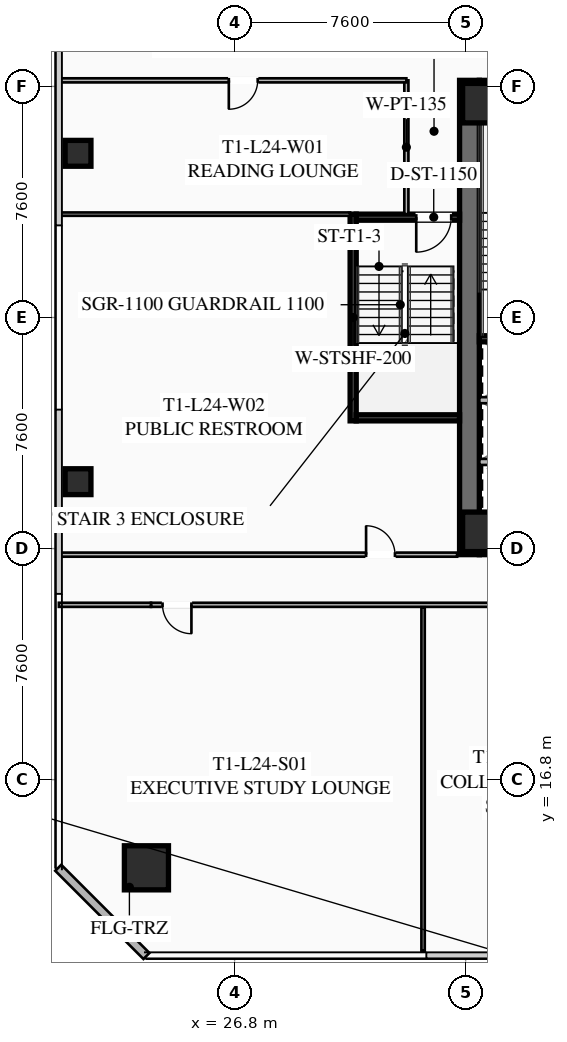
"""IFC4 building model, lengths in metres.
Left out: names, types, materials, properties, quantities, classifications, styles, units other than length and angle.
Written with IfcOpenShell. Run it as: python <this file> out.ifc"""

import sys

from ifc_helpers import new_model, si_unit, direction, frame, frame_2d, origin, origin_2d, place, context, subcontext, project, spatial, rectangle, hollow_rectangle, extrude, element, fill, save


model = new_model("IFC4")
c1 = context("Model", 3, precision=1e-05, world=origin(), true_north=direction((0.0, 1.0)))
c2 = subcontext(c1, "Body", "Model", "MODEL_VIEW")
j1 = project(units=[si_unit("LENGTHUNIT", "METRE"), si_unit("PLANEANGLEUNIT", "RADIAN")], contexts=[c1])
p1 = place(None, origin())
s1 = spatial("IfcSite", under=j1, at=p1, CompositionType="ELEMENT")
p2 = place(p1, origin())
s2 = spatial("IfcBuilding", under=s1, at=p2, CompositionType="ELEMENT")
p3 = place(p2, frame((0.0, 0.0, 92.05)))
s3 = spatial("IfcBuildingStorey", under=s2, at=p3, CompositionType="ELEMENT", Elevation=92.05)
p4 = place(p3, frame((34.525, 24.2, 0.0), z_axis=(0.0, 0.0, 1.0), x_axis=(0.0, 1.0, 0.0)))
e1 = element("IfcWall", 1, at=p4, inside=s3, PredefinedType="SHEAR", context=c2, shape_type="SweptSolid", body=[
    extrude(rectangle(XDim=15.6, YDim=0.65, at=frame_2d((7.8, 0.0))), origin(), (0.0, 0.0, 1.0), 3.55),
])
p5 = place(p3, frame((49.15, 24.525, 0.0), z_axis=(0.0, 0.0, 1.0), x_axis=(-1.0, 0.0, 0.0)))
e2 = element("IfcWall", 2, at=p5, inside=s3, PredefinedType="SHEAR", context=c2, shape_type="SweptSolid", body=[
    extrude(rectangle(XDim=14.3, YDim=0.65, at=frame_2d((7.15, 0.0))), origin(), (0.0, 0.0, 1.0), 3.55),
])
p6 = place(p5, frame((8.85, 0.0, 0.0)))
e3 = element("IfcOpeningElement", 3, at=p6, cuts=e2, PredefinedType="OPENING", context=c2, shape_type="SweptSolid", body=[
    extrude(rectangle(XDim=1.25, YDim=2.25, at=frame_2d((0.625, 1.125))), frame((0.0, 0.335, 0.0), z_axis=(0.0, -1.0, 0.0), x_axis=(1.0, 0.0, 0.0)), (0.0, 0.0, 1.0), 0.67),
])
p7 = place(p5, frame((3.8, 0.0, 0.0)))
e4 = element("IfcOpeningElement", 4, at=p7, cuts=e2, PredefinedType="OPENING", context=c2, shape_type="SweptSolid", body=[
    extrude(rectangle(XDim=1.25, YDim=2.25, at=frame_2d((0.625, 1.125))), frame((0.0, 0.335, 0.0), z_axis=(0.0, -1.0, 0.0), x_axis=(1.0, 0.0, 0.0)), (0.0, 0.0, 1.0), 0.67),
])
p8 = place(p3, frame((34.85, 39.475, 0.0), z_axis=(0.0, 0.0, 1.0), x_axis=(1.0, 0.0, 0.0)))
e5 = element("IfcWall", 5, at=p8, inside=s3, PredefinedType="SHEAR", context=c2, shape_type="SweptSolid", body=[
    extrude(rectangle(XDim=14.3, YDim=0.65, at=frame_2d((7.15, 0.0))), origin(), (0.0, 0.0, 1.0), 3.55),
])
p9 = place(p8, frame((4.2, 0.0, 0.0)))
e6 = element("IfcOpeningElement", 6, at=p9, cuts=e5, PredefinedType="OPENING", context=c2, shape_type="SweptSolid", body=[
    extrude(rectangle(XDim=1.25, YDim=2.25, at=frame_2d((0.625, 1.125))), frame((0.0, 0.335, 0.0), z_axis=(0.0, -1.0, 0.0), x_axis=(1.0, 0.0, 0.0)), (0.0, 0.0, 1.0), 0.67),
])
p10 = place(p8, frame((9.25, 0.0, 0.0)))
e7 = element("IfcOpeningElement", 7, at=p10, cuts=e5, PredefinedType="OPENING", context=c2, shape_type="SweptSolid", body=[
    extrude(rectangle(XDim=1.25, YDim=2.25, at=frame_2d((0.625, 1.125))), frame((0.0, 0.335, 0.0), z_axis=(0.0, -1.0, 0.0), x_axis=(1.0, 0.0, 0.0)), (0.0, 0.0, 1.0), 0.67),
])
for number, where, z_axis, x_axis in (
    (8, (34.95, 24.95, 0.0), (0.0, 0.0, 1.0), (1.0, 0.0, 0.0)),
    (9, (34.95, 39.05, 0.0), (0.0, 0.0, 1.0), (1.0, 0.0, 0.0)),
):
    element("IfcColumn", number, at=place(p3, frame(where, z_axis=z_axis, x_axis=x_axis)), inside=s3, PredefinedType="COLUMN", context=c2, shape_type="SweptSolid", body=[
        extrude(hollow_rectangle(XDim=1.3, YDim=1.3, WallThickness=0.05, at=origin_2d()), origin(), (0.0, 0.0, 1.0), 3.35),
    ])
p11 = place(p3, frame((23.9, 13.9, 0.0), z_axis=(0.0, 0.0, 1.0), x_axis=(1.0, 0.0, 0.0)))
e10 = element("IfcColumn", 10, at=p11, inside=s3, PredefinedType="COLUMN", context=c2, shape_type="SweptSolid", body=[
    extrude(hollow_rectangle(XDim=1.45, YDim=1.45, WallThickness=0.055, at=origin_2d()), origin(), (0.0, 0.0, 1.0), 3.35),
])
for number, where, z_axis, x_axis in (
    (11, (21.65, 37.4, 0.0), (0.0, 0.0, 1.0), (1.0, 0.0, 0.0)),
    (12, (21.65, 26.6, 0.0), (0.0, 0.0, 1.0), (1.0, 0.0, 0.0)),
):
    element("IfcColumn", number, at=place(p3, frame(where, z_axis=z_axis, x_axis=x_axis)), inside=s3, PredefinedType="COLUMN", context=c2, shape_type="SweptSolid", body=[
        extrude(hollow_rectangle(XDim=0.85, YDim=0.85, WallThickness=0.035, at=origin_2d()), origin(), (0.0, 0.0, 1.0), 3.35),
    ])
p12 = place(p3, frame((23.9, 11.0, 0.0), z_axis=(0.0, 0.0, 1.0), x_axis=(-0.707106781187, 0.707106781187, 0.0)))
e13 = element("IfcWall", 13, at=p12, inside=s3, PredefinedType="SOLIDWALL", context=c2, shape_type="SweptSolid", body=[
    extrude(rectangle(XDim=4.101, YDim=0.28, at=frame_2d((2.051, 0.0))), origin(), (0.0, 0.0, 1.0), 3.35),
])
for number, where, z_axis, x_axis in (
    (14, (34.85, 31.3, 0.0), (0.0, 0.0, 1.0), (1.0, 0.0, 0.0)),
    (15, (34.85, 38.7, 0.0), (0.0, 0.0, 1.0), (1.0, 0.0, 0.0)),
):
    element("IfcWall", number, at=place(p3, frame(where, z_axis=z_axis, x_axis=x_axis)), inside=s3, PredefinedType="SHEAR", context=c2, shape_type="SweptSolid", body=[
        extrude(rectangle(XDim=3.45, YDim=0.2, at=frame_2d((1.725, 0.0))), origin(), (0.0, 0.0, 1.0), 3.35),
    ])
for number, where, z_axis, x_axis in (
    (16, (34.85, 27.25, 0.0), (0.0, 0.0, 1.0), (1.0, 0.0, 0.0)),
    (17, (34.85, 29.28, 0.0), (0.0, 0.0, 1.0), (1.0, 0.0, 0.0)),
):
    element("IfcWall", number, at=place(p3, frame(where, z_axis=z_axis, x_axis=x_axis)), inside=s3, PredefinedType="SOLIDWALL", context=c2, shape_type="SweptSolid", body=[
        extrude(rectangle(XDim=3.1, YDim=0.2, at=frame_2d((1.55, 0.0))), origin(), (0.0, 0.0, 1.0), 3.35),
    ])
p13 = place(p3, frame((30.7, 28.6, 0.0), z_axis=(0.0, 0.0, 1.0), x_axis=(0.0, 1.0, 0.0)))
e18 = element("IfcWall", 18, at=p13, inside=s3, PredefinedType="SHEAR", context=c2, shape_type="SweptSolid", body=[
    extrude(rectangle(XDim=6.8, YDim=0.2, at=frame_2d((3.4, 0.0))), origin(), (0.0, 0.0, 1.0), 3.35),
])
p14 = place(p3, frame((34.2, 35.3, 0.0), z_axis=(0.0, 0.0, 1.0), x_axis=(-1.0, 0.0, 0.0)))
e19 = element("IfcWall", 19, at=p14, inside=s3, PredefinedType="SHEAR", context=c2, shape_type="SweptSolid", body=[
    extrude(rectangle(XDim=3.4, YDim=0.2, at=frame_2d((1.7, 0.0))), origin(), (0.0, 0.0, 1.0), 3.35),
])
p15 = place(p14, frame((0.275, 0.0, 0.0)))
e20 = element("IfcOpeningElement", 20, at=p15, cuts=e19, PredefinedType="OPENING", context=c2, shape_type="SweptSolid", body=[
    extrude(rectangle(XDim=1.15, YDim=2.2, at=frame_2d((0.575, 1.1))), frame((0.0, 0.11, 0.0), z_axis=(0.0, -1.0, 0.0), x_axis=(1.0, 0.0, 0.0)), (0.0, 0.0, 1.0), 0.22),
])
p16 = place(p3, frame((30.8, 28.7, 0.0), z_axis=(0.0, 0.0, 1.0), x_axis=(1.0, 0.0, 0.0)))
e21 = element("IfcWall", 21, at=p16, inside=s3, PredefinedType="SHEAR", context=c2, shape_type="SweptSolid", body=[
    extrude(rectangle(XDim=3.4, YDim=0.2, at=frame_2d((1.7, 0.0))), origin(), (0.0, 0.0, 1.0), 3.35),
])
p17 = place(p3, frame((32.45, 35.4, 0.0), z_axis=(0.0, 0.0, 1.0), x_axis=(0.0, 1.0, 0.0)))
e22 = element("IfcWall", 22, at=p17, inside=s3, PredefinedType="PARTITIONING", context=c2, shape_type="SweptSolid", body=[
    extrude(rectangle(XDim=4.4, YDim=0.135, at=frame_2d((2.2, 0.0))), origin(), (0.0, 0.0, 1.0), 2.703),
])
p18 = place(p3, frame((53.1, 22.55, 0.0), z_axis=(0.0, 0.0, 1.0), x_axis=(-1.0, 0.0, 0.0)))
e23 = element("IfcWall", 23, at=p18, inside=s3, PredefinedType="PARTITIONING", context=c2, shape_type="SweptSolid", body=[
    extrude(rectangle(XDim=29.05, YDim=0.135, at=frame_2d((14.525, 0.0))), origin(), (0.0, 0.0, 1.0), 2.703),
])
p19 = place(p18, frame((27.72, 0.0, 0.0)))
e24 = element("IfcOpeningElement", 24, at=p19, cuts=e23, PredefinedType="OPENING", context=c2, shape_type="SweptSolid", body=[
    extrude(rectangle(XDim=0.95, YDim=2.05, at=frame_2d((0.475, 1.025))), frame((0.0, 0.077, 0.0), z_axis=(0.0, -1.0, 0.0), x_axis=(1.0, 0.0, 0.0)), (0.0, 0.0, 1.0), 0.155),
])
p20 = place(p18, frame((14.601, 0.0, 0.0)))
e25 = element("IfcOpeningElement", 25, at=p20, cuts=e23, PredefinedType="OPENING", context=c2, shape_type="SweptSolid", body=[
    extrude(rectangle(XDim=0.95, YDim=2.05, at=frame_2d((0.475, 1.025))), frame((0.0, 0.077, 0.0), z_axis=(0.0, -1.0, 0.0), x_axis=(1.0, 0.0, 0.0)), (0.0, 0.0, 1.0), 0.155),
])
p21 = place(p18, frame((10.351, 0.0, 0.0)))
e26 = element("IfcOpeningElement", 26, at=p21, cuts=e23, PredefinedType="OPENING", context=c2, shape_type="SweptSolid", body=[
    extrude(rectangle(XDim=0.95, YDim=2.05, at=frame_2d((0.475, 1.025))), frame((0.0, 0.077, 0.0), z_axis=(0.0, -1.0, 0.0), x_axis=(1.0, 0.0, 0.0)), (0.0, 0.0, 1.0), 0.155),
])
p22 = place(p18, frame((6.37, 0.0, 0.0)))
e27 = element("IfcOpeningElement", 27, at=p22, cuts=e23, PredefinedType="OPENING", context=c2, shape_type="SweptSolid", body=[
    extrude(rectangle(XDim=0.95, YDim=2.05, at=frame_2d((0.475, 1.025))), frame((0.0, 0.077, 0.0), z_axis=(0.0, -1.0, 0.0), x_axis=(1.0, 0.0, 0.0)), (0.0, 0.0, 1.0), 0.155),
])
p23 = place(p18, frame((0.38, 0.0, 0.0)))
e28 = element("IfcOpeningElement", 28, at=p23, cuts=e23, PredefinedType="OPENING", context=c2, shape_type="SweptSolid", body=[
    extrude(rectangle(XDim=0.95, YDim=2.05, at=frame_2d((0.475, 1.025))), frame((0.0, 0.077, 0.0), z_axis=(0.0, -1.0, 0.0), x_axis=(1.0, 0.0, 0.0)), (0.0, 0.0, 1.0), 0.155),
])
p24 = place(p3, frame((21.02, 22.55, 0.0), z_axis=(0.0, 0.0, 1.0), x_axis=(1.0, 0.0, 0.0)))
e29 = element("IfcWall", 29, at=p24, inside=s3, PredefinedType="PARTITIONING", context=c2, shape_type="SweptSolid", body=[
    extrude(rectangle(XDim=3.03, YDim=0.135, at=frame_2d((1.515, 0.0))), origin(), (0.0, 0.0, 1.0), 2.703),
])
p25 = place(p3, frame((33.0, 11.17, 0.0), z_axis=(0.0, 0.0, 1.0), x_axis=(0.0, 1.0, 0.0)))
e30 = element("IfcWall", 30, at=p25, inside=s3, PredefinedType="PARTITIONING", context=c2, shape_type="SweptSolid", body=[
    extrude(rectangle(XDim=11.3, YDim=0.11, at=frame_2d((5.65, 0.0))), origin(), (0.0, 0.0, 1.0), 2.703),
])
p26 = place(p3, frame((32.45, 39.8, 0.0), z_axis=(0.0, 0.0, 1.0), x_axis=(-1.0, 0.0, 0.0)))
e31 = element("IfcWall", 31, at=p26, inside=s3, PredefinedType="PARTITIONING", context=c2, shape_type="SweptSolid", body=[
    extrude(rectangle(XDim=11.43, YDim=0.135, at=frame_2d((5.715, 0.0))), origin(), (0.0, 0.0, 1.0), 2.703),
])
p27 = place(p26, frame((4.89, 0.0, 0.0)))
e32 = element("IfcOpeningElement", 32, at=p27, cuts=e31, PredefinedType="OPENING", context=c2, shape_type="SweptSolid", body=[
    extrude(rectangle(XDim=0.95, YDim=2.05, at=frame_2d((0.475, 1.025))), frame((0.0, 0.077, 0.0), z_axis=(0.0, -1.0, 0.0), x_axis=(1.0, 0.0, 0.0)), (0.0, 0.0, 1.0), 0.155),
])
p28 = place(p3, frame((21.02, 24.2, 0.0), z_axis=(0.0, 0.0, 1.0), x_axis=(1.0, 0.0, 0.0)))
e33 = element("IfcWall", 33, at=p28, inside=s3, PredefinedType="PARTITIONING", context=c2, shape_type="SweptSolid", body=[
    extrude(rectangle(XDim=13.1, YDim=0.135, at=frame_2d((6.55, 0.0))), origin(), (0.0, 0.0, 1.0), 2.703),
])
p29 = place(p28, frame((10.105, 0.0, 0.0)))
e34 = element("IfcOpeningElement", 34, at=p29, cuts=e33, PredefinedType="OPENING", context=c2, shape_type="SweptSolid", body=[
    extrude(rectangle(XDim=0.95, YDim=2.05, at=frame_2d((0.475, 1.025))), frame((0.0, 0.077, 0.0), z_axis=(0.0, -1.0, 0.0), x_axis=(1.0, 0.0, 0.0)), (0.0, 0.0, 1.0), 0.155),
])
p30 = place(p3, frame((30.6, 35.4, 0.0), z_axis=(0.0, 0.0, 1.0), x_axis=(-1.0, 0.0, 0.0)))
e35 = element("IfcWall", 35, at=p30, inside=s3, PredefinedType="PARTITIONING", context=c2, shape_type="SweptSolid", body=[
    extrude(rectangle(XDim=9.58, YDim=0.11, at=frame_2d((4.79, 0.0))), origin(), (0.0, 0.0, 1.0), 2.703),
])
p31 = place(p15, origin())
e36 = element("IfcDoor", 36, at=p31, inside=s3, OperationType="SINGLE_SWING_RIGHT", PredefinedType="DOOR", context=c2, shape_type="SweptSolid", body=[
    extrude(rectangle(XDim=1.15, YDim=2.2, at=frame_2d((0.575, 1.1))), frame((0.0, 0.025, 0.0), z_axis=(0.0, -1.0, 0.0), x_axis=(1.0, 0.0, 0.0)), (0.0, 0.0, 1.0), 0.05),
])
fill(e20, e36)
p32 = place(p19, origin())
e37 = element("IfcDoor", 37, at=p32, inside=s3, OperationType="SINGLE_SWING_LEFT", PredefinedType="DOOR", context=c2, shape_type="SweptSolid", body=[
    extrude(rectangle(XDim=0.95, YDim=2.05, at=frame_2d((0.475, 1.025))), frame((0.0, 0.025, 0.0), z_axis=(0.0, -1.0, 0.0), x_axis=(1.0, 0.0, 0.0)), (0.0, 0.0, 1.0), 0.05),
])
fill(e24, e37)
p33 = place(p27, origin())
e38 = element("IfcDoor", 38, at=p33, inside=s3, OperationType="SINGLE_SWING_RIGHT", PredefinedType="DOOR", context=c2, shape_type="SweptSolid", body=[
    extrude(rectangle(XDim=0.95, YDim=2.05, at=frame_2d((0.475, 1.025))), frame((0.0, 0.025, 0.0), z_axis=(0.0, -1.0, 0.0), x_axis=(1.0, 0.0, 0.0)), (0.0, 0.0, 1.0), 0.05),
])
fill(e32, e38)
p34 = place(p29, origin())
e39 = element("IfcDoor", 39, at=p34, inside=s3, OperationType="SINGLE_SWING_LEFT", PredefinedType="DOOR", context=c2, shape_type="SweptSolid", body=[
    extrude(rectangle(XDim=0.95, YDim=2.05, at=frame_2d((0.475, 1.025))), frame((0.0, 0.025, 0.0), z_axis=(0.0, -1.0, 0.0), x_axis=(1.0, 0.0, 0.0)), (0.0, 0.0, 1.0), 0.05),
])
fill(e34, e39)
save(model, sys.argv[1])
